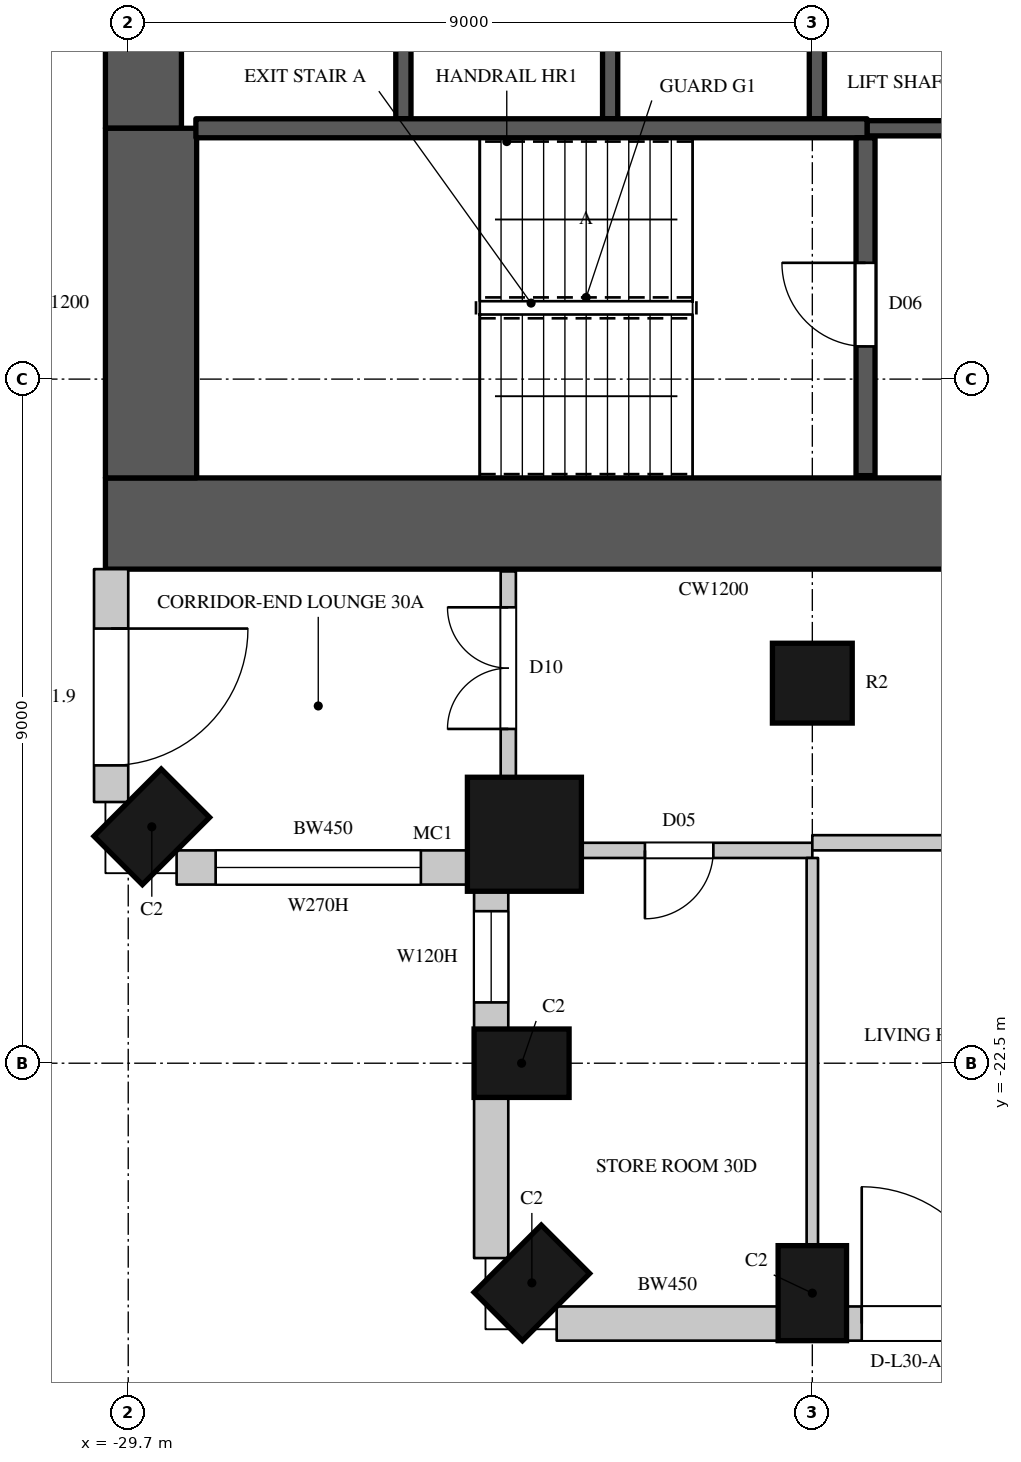
"""IFC4 building model, lengths in metres.
Left out: names, types, materials, properties, quantities, classifications, styles, units other than length and angle.
Written with IfcOpenShell. Run it as: python <this file> out.ifc"""

import sys

from ifc_helpers import new_model, si_unit, direction, frame, frame_2d, origin, origin_2d, place, context, subcontext, project, spatial, rectangle, circle, extrude, element, fill, save


model = new_model("IFC4")
c1 = context("Model", 3, precision=1e-05, world=origin(), true_north=direction((0.0, 1.0)))
c2 = subcontext(c1, "Body", "Model", "MODEL_VIEW")
j1 = project(units=[si_unit("LENGTHUNIT", "METRE"), si_unit("PLANEANGLEUNIT", "RADIAN")], contexts=[c1])
p1 = place(None, origin())
s1 = spatial("IfcSite", under=j1, at=p1, CompositionType="ELEMENT")
p2 = place(p1, origin())
s2 = spatial("IfcBuilding", under=s1, at=p2, CompositionType="ELEMENT")
p3 = place(p2, frame((0.0, 0.0, 138.3)))
s3 = spatial("IfcBuildingStorey", under=s2, at=p3, CompositionType="ELEMENT", Elevation=138.3)
p4 = place(p3, frame((-29.39, -19.39, 0.0), z_axis=(0.0, 0.0, 1.0), x_axis=(0.707106781187, -0.707106781187, 0.0)))
e1 = element("IfcColumn", 1, at=p4, inside=s3, PredefinedType="COLUMN", context=c2, shape_type="SweptSolid", body=[
    extrude(rectangle(XDim=0.9, YDim=1.25, at=origin_2d()), origin(), (0.0, 0.0, 1.0), 3.6),
])
p5 = place(p3, frame((-24.488, -19.488, 0.0), z_axis=(0.0, 0.0, 1.0), x_axis=(1.0, 0.0, 0.0)))
e2 = element("IfcColumn", 2, at=p5, inside=s3, PredefinedType="COLUMN", context=c2, shape_type="SweptSolid", body=[
    extrude(circle(Radius=0.75, at=origin_2d()), origin(), (0.0, 0.0, 1.0), 3.6),
])
for number, where, z_axis, x_axis in (
    (3, (-24.525, -22.5, 0.0), (0.0, 0.0, 1.0), (0.0, -1.0, 0.0)),
    (4, (-24.39, -25.39, 0.0), (0.0, 0.0, 1.0), (0.707, -0.707, 0.0)),
    (5, (-20.7, -25.525, 0.0), (0.0, 0.0, 1.0), (1.0, 0.0, 0.0)),
):
    element("IfcColumn", number, at=place(p3, frame(where, z_axis=z_axis, x_axis=x_axis)), inside=s3, PredefinedType="COLUMN", context=c2, shape_type="SweptSolid", body=[
        extrude(rectangle(XDim=0.9, YDim=1.25, at=origin_2d()), origin(), (0.0, 0.0, 1.0), 3.6),
    ])
p6 = place(p3, frame((-20.7, -17.5, 0.0), z_axis=(0.0, 0.0, 1.0), x_axis=(1.0, 0.0, 0.0)))
e6 = element("IfcColumn", 6, at=p6, inside=s3, PredefinedType="COLUMN", context=c2, shape_type="SweptSolid", body=[
    extrude(circle(Radius=0.525, at=origin_2d()), origin(), (0.0, 0.0, 1.0), 3.6),
])
p7 = place(p3, frame((-29.925, -16.0, 0.0), z_axis=(0.0, 0.0, 1.0), x_axis=(0.0, -1.0, 0.0)))
e7 = element("IfcWall", 7, at=p7, inside=s3, PredefinedType="SOLIDWALL", context=c2, shape_type="SweptSolid", body=[
    extrude(rectangle(XDim=3.064, YDim=0.45, at=frame_2d((1.532, 0.0))), origin(), (0.0, 0.0, 1.0), 3.3),
])
p8 = place(p7, frame((0.782, 0.0, 0.0)))
e8 = element("IfcOpeningElement", 8, at=p8, cuts=e7, PredefinedType="OPENING", context=c2, shape_type="SweptSolid", body=[
    extrude(rectangle(XDim=1.8, YDim=2.4, at=frame_2d((0.9, 1.2))), frame((0.0, 0.235, 0.0), z_axis=(0.0, -1.0, 0.0), x_axis=(1.0, 0.0, 0.0)), (0.0, 0.0, 1.0), 0.47),
])
p9 = place(p3, frame((-29.064, -19.925, 0.0), z_axis=(0.0, 0.0, 1.0), x_axis=(1.0, 0.0, 0.0)))
e9 = element("IfcWall", 9, at=p9, inside=s3, PredefinedType="SOLIDWALL", context=c2, shape_type="SweptSolid", body=[
    extrude(rectangle(XDim=3.857, YDim=0.45, at=frame_2d((1.928, 0.0))), origin(), (0.0, 0.0, 1.0), 3.3),
])
p10 = place(p9, frame((0.514, 0.0, 1.05)))
e10 = element("IfcOpeningElement", 10, at=p10, cuts=e9, PredefinedType="OPENING", context=c2, shape_type="SweptSolid", body=[
    extrude(rectangle(XDim=2.7, YDim=2.0, at=frame_2d((1.35, 1.0))), frame((0.0, 0.235, 0.0), z_axis=(0.0, -1.0, 0.0), x_axis=(1.0, 0.0, 0.0)), (0.0, 0.0, 1.0), 0.47),
])
p11 = place(p3, frame((-24.925, -20.207, 0.0), z_axis=(0.0, 0.0, 1.0), x_axis=(0.0, -1.0, 0.0)))
e11 = element("IfcWall", 11, at=p11, inside=s3, PredefinedType="SOLIDWALL", context=c2, shape_type="SweptSolid", body=[
    extrude(rectangle(XDim=1.843, YDim=0.45, at=frame_2d((0.921, 0.0))), origin(), (0.0, 0.0, 1.0), 3.3),
])
p12 = place(p11, frame((0.293, 0.0, 1.05)))
e12 = element("IfcOpeningElement", 12, at=p12, cuts=e11, PredefinedType="OPENING", context=c2, shape_type="SweptSolid", body=[
    extrude(rectangle(XDim=1.2, YDim=2.0, at=frame_2d((0.6, 1.0))), frame((0.0, 0.235, 0.0), z_axis=(0.0, -1.0, 0.0), x_axis=(1.0, 0.0, 0.0)), (0.0, 0.0, 1.0), 0.47),
])
p13 = place(p3, frame((-24.925, -22.95, 0.0), z_axis=(0.0, 0.0, 1.0), x_axis=(0.0, -1.0, 0.0)))
e13 = element("IfcWall", 13, at=p13, inside=s3, PredefinedType="SOLIDWALL", context=c2, shape_type="SweptSolid", body=[
    extrude(rectangle(XDim=2.114, YDim=0.45, at=frame_2d((1.057, 0.0))), origin(), (0.0, 0.0, 1.0), 3.3),
])
p14 = place(p3, frame((-24.064, -25.925, 0.0), z_axis=(0.0, 0.0, 1.0), x_axis=(1.0, 0.0, 0.0)))
e14 = element("IfcWall", 14, at=p14, inside=s3, PredefinedType="SOLIDWALL", context=c2, shape_type="SweptSolid", body=[
    extrude(rectangle(XDim=2.914, YDim=0.45, at=frame_2d((1.457, 0.0))), origin(), (0.0, 0.0, 1.0), 3.3),
])
p15 = place(p3, frame((-20.25, -25.925, 0.0), z_axis=(0.0, 0.0, 1.0), x_axis=(1.0, 0.0, 0.0)))
e15 = element("IfcWall", 15, at=p15, inside=s3, PredefinedType="SOLIDWALL", context=c2, shape_type="SweptSolid", body=[
    extrude(rectangle(XDim=8.1, YDim=0.45, at=frame_2d((4.05, 0.0))), origin(), (0.0, 0.0, 1.0), 3.3),
])
p16 = place(p15, frame((0.2, 0.0, 0.0)))
e16 = element("IfcOpeningElement", 16, at=p16, cuts=e15, PredefinedType="OPENING", context=c2, shape_type="SweptSolid", body=[
    extrude(rectangle(XDim=1.8, YDim=2.4, at=frame_2d((0.9, 1.2))), frame((0.0, 0.235, 0.0), z_axis=(0.0, -1.0, 0.0), x_axis=(1.0, 0.0, 0.0)), (0.0, 0.0, 1.0), 0.47),
])
p17 = place(p15, frame((2.2, 0.0, 1.05)))
e17 = element("IfcOpeningElement", 17, at=p17, cuts=e15, PredefinedType="OPENING", context=c2, shape_type="SweptSolid", body=[
    extrude(rectangle(XDim=1.2, YDim=2.0, at=frame_2d((0.6, 1.0))), frame((0.0, 0.235, 0.0), z_axis=(0.0, -1.0, 0.0), x_axis=(1.0, 0.0, 0.0)), (0.0, 0.0, 1.0), 0.47),
])
p18 = place(p15, frame((4.249, 0.0, 0.0)))
e18 = element("IfcOpeningElement", 18, at=p18, cuts=e15, PredefinedType="OPENING", context=c2, shape_type="SweptSolid", body=[
    extrude(rectangle(XDim=1.8, YDim=2.4, at=frame_2d((0.9, 1.2))), frame((0.0, 0.235, 0.0), z_axis=(0.0, -1.0, 0.0), x_axis=(1.0, 0.0, 0.0)), (0.0, 0.0, 1.0), 0.47),
])
p19 = place(p15, frame((6.7, 0.0, 1.05)))
e19 = element("IfcOpeningElement", 19, at=p19, cuts=e15, PredefinedType="OPENING", context=c2, shape_type="SweptSolid", body=[
    extrude(rectangle(XDim=1.2, YDim=2.0, at=frame_2d((0.6, 1.0))), frame((0.0, 0.235, 0.0), z_axis=(0.0, -1.0, 0.0), x_axis=(1.0, 0.0, 0.0)), (0.0, 0.0, 1.0), 0.47),
])
p20 = place(p3, frame((-30.0, -15.4, 0.0), z_axis=(0.0, 0.0, 1.0), x_axis=(1.0, 0.0, 0.0)))
e20 = element("IfcWall", 20, at=p20, inside=s3, PredefinedType="SHEAR", context=c2, shape_type="SweptSolid", body=[
    extrude(rectangle(XDim=16.0, YDim=1.2, at=frame_2d((8.0, 0.0))), origin(), (0.0, 0.0, 1.0), 3.6),
])
p21 = place(p20, frame((13.4, 0.0, 0.0)))
e21 = element("IfcOpeningElement", 21, at=p21, cuts=e20, PredefinedType="OPENING", context=c2, shape_type="SweptSolid", body=[
    extrude(rectangle(XDim=1.5, YDim=2.4, at=frame_2d((0.75, 1.2))), frame((0.0, 0.61, 0.0), z_axis=(0.0, -1.0, 0.0), x_axis=(1.0, 0.0, 0.0)), (0.0, 0.0, 1.0), 1.22),
])
p22 = place(p3, frame((-29.5, -10.2, 0.0), z_axis=(0.0, 0.0, 1.0), x_axis=(0.0, 1.0, 0.0)))
e22 = element("IfcWall", 22, at=p22, inside=s3, PredefinedType="SHEAR", context=c2, shape_type="SweptSolid", body=[
    extrude(rectangle(XDim=20.4, YDim=1.0, at=frame_2d((10.2, 0.0))), origin(), (0.0, 0.0, 1.0), 3.6),
])
p23 = place(p3, frame((-29.4, -14.8, 0.0), z_axis=(0.0, 0.0, 1.0), x_axis=(0.0, 1.0, 0.0)))
e23 = element("IfcWall", 23, at=p23, inside=s3, PredefinedType="SHEAR", context=c2, shape_type="SweptSolid", body=[
    extrude(rectangle(XDim=4.6, YDim=1.2, at=frame_2d((2.3, 0.0))), origin(), (0.0, 0.0, 1.0), 3.6),
])
p24 = place(p3, frame((-24.7, -18.752, 0.0), z_axis=(0.0, 0.0, 1.0), x_axis=(0.0, 1.0, 0.0)))
e24 = element("IfcWall", 24, at=p24, inside=s3, PredefinedType="PARTITIONING", context=c2, shape_type="SweptSolid", body=[
    extrude(rectangle(XDim=2.722, YDim=0.2, at=frame_2d((1.361, 0.0))), origin(), (0.0, 0.0, 1.0), 3.3),
])
p25 = place(p24, frame((0.65, 0.0, 0.0)))
e25 = element("IfcOpeningElement", 25, at=p25, cuts=e24, PredefinedType="OPENING", context=c2, shape_type="SweptSolid", body=[
    extrude(rectangle(XDim=1.6, YDim=2.4, at=frame_2d((0.8, 1.2))), frame((0.0, 0.11, 0.0), z_axis=(0.0, -1.0, 0.0), x_axis=(1.0, 0.0, 0.0)), (0.0, 0.0, 1.0), 0.22),
])
p26 = place(p3, frame((-23.752, -19.7, 0.0), z_axis=(0.0, 0.0, 1.0), x_axis=(1.0, 0.0, 0.0)))
e26 = element("IfcWall", 26, at=p26, inside=s3, PredefinedType="PARTITIONING", context=c2, shape_type="SweptSolid", body=[
    extrude(rectangle(XDim=3.052, YDim=0.2, at=frame_2d((1.526, 0.0))), origin(), (0.0, 0.0, 1.0), 3.3),
])
p27 = place(p26, frame((0.85, 0.0, 0.0)))
e27 = element("IfcOpeningElement", 27, at=p27, cuts=e26, PredefinedType="OPENING", context=c2, shape_type="SweptSolid", body=[
    extrude(rectangle(XDim=0.9, YDim=2.2, at=frame_2d((0.45, 1.1))), frame((0.0, 0.11, 0.0), z_axis=(0.0, -1.0, 0.0), x_axis=(1.0, 0.0, 0.0)), (0.0, 0.0, 1.0), 0.22),
])
p28 = place(p3, frame((-20.7, -19.6, 0.0), z_axis=(0.0, 0.0, 1.0), x_axis=(1.0, 0.0, 0.0)))
e28 = element("IfcWall", 28, at=p28, inside=s3, PredefinedType="PARTITIONING", context=c2, shape_type="SweptSolid", body=[
    extrude(rectangle(XDim=38.825, YDim=0.2, at=frame_2d((19.413, 0.0))), origin(), (0.0, 0.0, 1.0), 3.3),
])
p29 = place(p28, frame((3.15, 0.0, 0.0)))
e29 = element("IfcOpeningElement", 29, at=p29, cuts=e28, PredefinedType="OPENING", context=c2, shape_type="SweptSolid", body=[
    extrude(rectangle(XDim=1.1, YDim=2.4, at=frame_2d((0.55, 1.2))), frame((0.0, 0.11, 0.0), z_axis=(0.0, -1.0, 0.0), x_axis=(1.0, 0.0, 0.0)), (0.0, 0.0, 1.0), 0.22),
])
p30 = place(p28, frame((14.85, 0.0, 0.0)))
e30 = element("IfcOpeningElement", 30, at=p30, cuts=e28, PredefinedType="OPENING", context=c2, shape_type="SweptSolid", body=[
    extrude(rectangle(XDim=1.1, YDim=2.4, at=frame_2d((0.55, 1.2))), frame((0.0, 0.11, 0.0), z_axis=(0.0, -1.0, 0.0), x_axis=(1.0, 0.0, 0.0)), (0.0, 0.0, 1.0), 0.22),
])
p31 = place(p28, frame((23.85, 0.0, 0.0)))
e31 = element("IfcOpeningElement", 31, at=p31, cuts=e28, PredefinedType="OPENING", context=c2, shape_type="SweptSolid", body=[
    extrude(rectangle(XDim=1.1, YDim=2.4, at=frame_2d((0.55, 1.2))), frame((0.0, 0.11, 0.0), z_axis=(0.0, -1.0, 0.0), x_axis=(1.0, 0.0, 0.0)), (0.0, 0.0, 1.0), 0.22),
])
p32 = place(p28, frame((37.3, 0.0, 0.0)))
e32 = element("IfcOpeningElement", 32, at=p32, cuts=e28, PredefinedType="OPENING", context=c2, shape_type="SweptSolid", body=[
    extrude(rectangle(XDim=0.95, YDim=2.2, at=frame_2d((0.475, 1.1))), frame((0.0, 0.11, 0.0), z_axis=(0.0, -1.0, 0.0), x_axis=(1.0, 0.0, 0.0)), (0.0, 0.0, 1.0), 0.22),
])
p33 = place(p3, frame((-20.7, -24.9, 0.0), z_axis=(0.0, 0.0, 1.0), x_axis=(0.0, 1.0, 0.0)))
e33 = element("IfcWall", 33, at=p33, inside=s3, PredefinedType="PARTITIONING", context=c2, shape_type="SweptSolid", body=[
    extrude(rectangle(XDim=5.1, YDim=0.15, at=frame_2d((2.55, 0.0))), origin(), (0.0, 0.0, 1.0), 2.75),
])
for number, where, z_axis, x_axis in (
    (34, (-26.08, -10.075, 0.0), (0.0, 0.0, 1.0), (0.0, 1.0, 0.0)),
    (35, (-23.36, -10.075, 0.0), (0.0, 0.0, 1.0), (0.0, 1.0, 0.0)),
    (36, (-20.64, -10.075, 0.0), (0.0, 0.0, 1.0), (0.0, 1.0, 0.0)),
):
    element("IfcWall", number, at=place(p3, frame(where, z_axis=z_axis, x_axis=x_axis)), inside=s3, PredefinedType="SHEAR", context=c2, shape_type="SweptSolid", body=[
        extrude(rectangle(XDim=2.575, YDim=0.2, at=frame_2d((1.288, 0.0))), origin(), (0.0, 0.0, 1.0), 3.6),
    ])
p34 = place(p3, frame((-19.98, -10.2, 0.0), z_axis=(0.0, 0.0, 1.0), x_axis=(1.0, 0.0, 0.0)))
e37 = element("IfcWall", 37, at=p34, inside=s3, PredefinedType="SHEAR", context=c2, shape_type="SweptSolid", body=[
    extrude(rectangle(XDim=4.95, YDim=0.2, at=frame_2d((2.475, 0.0))), origin(), (0.0, 0.0, 1.0), 3.3),
])
p35 = place(p34, frame((2.95, 0.0, 0.0)))
e38 = element("IfcOpeningElement", 38, at=p35, cuts=e37, PredefinedType="OPENING", context=c2, shape_type="SweptSolid", body=[
    extrude(rectangle(XDim=1.1, YDim=2.2, at=frame_2d((0.55, 1.1))), frame((0.0, 0.11, 0.0), z_axis=(0.0, -1.0, 0.0), x_axis=(1.0, 0.0, 0.0)), (0.0, 0.0, 1.0), 0.22),
])
p36 = place(p3, frame((-28.81, -10.2, 0.0), z_axis=(0.0, 0.0, 1.0), x_axis=(1.0, 0.0, 0.0)))
e39 = element("IfcWall", 39, at=p36, inside=s3, PredefinedType="SHEAR", context=c2, shape_type="SweptSolid", body=[
    extrude(rectangle(XDim=8.83, YDim=0.25, at=frame_2d((4.415, 0.0))), origin(), (0.0, 0.0, 1.0), 3.3),
])
p37 = place(p3, frame((-20.0, -14.77, 0.0), z_axis=(0.0, 0.0, 1.0), x_axis=(0.0, 1.0, 0.0)))
e40 = element("IfcWall", 40, at=p37, inside=s3, PredefinedType="SHEAR", context=c2, shape_type="SweptSolid", body=[
    extrude(rectangle(XDim=4.445, YDim=0.25, at=frame_2d((2.223, 0.0))), origin(), (0.0, 0.0, 1.0), 3.3),
])
p38 = place(p37, frame((1.7, 0.0, 0.0)))
e41 = element("IfcOpeningElement", 41, at=p38, cuts=e40, PredefinedType="OPENING", context=c2, shape_type="SweptSolid", body=[
    extrude(rectangle(XDim=1.1, YDim=2.2, at=frame_2d((0.55, 1.1))), frame((0.0, 0.135, 0.0), z_axis=(0.0, -1.0, 0.0), x_axis=(1.0, 0.0, 0.0)), (0.0, 0.0, 1.0), 0.27),
])
p39 = place(p8, origin())
e42 = element("IfcDoor", 42, at=p39, inside=s3, OperationType="SLIDING_TO_LEFT", PredefinedType="DOOR", context=c2, shape_type="SweptSolid", body=[
    extrude(rectangle(XDim=1.8, YDim=2.4, at=frame_2d((0.9, 1.2))), frame((0.0, 0.13, 0.0), z_axis=(0.0, -1.0, 0.0), x_axis=(1.0, 0.0, 0.0)), (0.0, 0.0, 1.0), 0.05),
])
fill(e8, e42)
p40 = place(p10, origin())
e43 = element("IfcWindow", 43, at=p40, inside=s3, PartitioningType="SINGLE_PANEL", PredefinedType="WINDOW", context=c2, shape_type="SweptSolid", body=[
    extrude(rectangle(XDim=2.7, YDim=2.0, at=frame_2d((1.35, 1.0))), frame((0.0, 0.135, 0.0), z_axis=(0.0, -1.0, 0.0), x_axis=(1.0, 0.0, 0.0)), (0.0, 0.0, 1.0), 0.06),
])
fill(e10, e43)
p41 = place(p12, origin())
e44 = element("IfcWindow", 44, at=p41, inside=s3, PartitioningType="SINGLE_PANEL", PredefinedType="WINDOW", context=c2, shape_type="SweptSolid", body=[
    extrude(rectangle(XDim=1.2, YDim=2.0, at=frame_2d((0.6, 1.0))), frame((0.0, 0.135, 0.0), z_axis=(0.0, -1.0, 0.0), x_axis=(1.0, 0.0, 0.0)), (0.0, 0.0, 1.0), 0.06),
])
fill(e12, e44)
p42 = place(p16, origin())
e45 = element("IfcDoor", 45, at=p42, inside=s3, OperationType="SLIDING_TO_LEFT", PredefinedType="DOOR", context=c2, shape_type="SweptSolid", body=[
    extrude(rectangle(XDim=1.8, YDim=2.4, at=frame_2d((0.9, 1.2))), frame((0.0, 0.13, 0.0), z_axis=(0.0, -1.0, 0.0), x_axis=(1.0, 0.0, 0.0)), (0.0, 0.0, 1.0), 0.05),
])
fill(e16, e45)
p43 = place(p38, origin())
e46 = element("IfcDoor", 46, at=p43, inside=s3, OperationType="SINGLE_SWING_RIGHT", PredefinedType="DOOR", context=c2, shape_type="SweptSolid", body=[
    extrude(rectangle(XDim=1.1, YDim=2.2, at=frame_2d((0.55, 1.1))), frame((0.0, 0.025, 0.0), z_axis=(0.0, -1.0, 0.0), x_axis=(1.0, 0.0, 0.0)), (0.0, 0.0, 1.0), 0.05),
])
fill(e41, e46)
p44 = place(p27, origin())
e47 = element("IfcDoor", 47, at=p44, inside=s3, OperationType="SINGLE_SWING_RIGHT", PredefinedType="DOOR", context=c2, shape_type="SweptSolid", body=[
    extrude(rectangle(XDim=0.9, YDim=2.2, at=frame_2d((0.45, 1.1))), frame((0.0, 0.025, 0.0), z_axis=(0.0, -1.0, 0.0), x_axis=(1.0, 0.0, 0.0)), (0.0, 0.0, 1.0), 0.05),
])
fill(e27, e47)
p45 = place(p25, origin())
e48 = element("IfcDoor", 48, at=p45, inside=s3, OperationType="DOUBLE_DOOR_SINGLE_SWING", PredefinedType="DOOR", context=c2, shape_type="SweptSolid", body=[
    extrude(rectangle(XDim=1.6, YDim=2.4, at=frame_2d((0.8, 1.2))), frame((0.0, 0.025, 0.0), z_axis=(0.0, -1.0, 0.0), x_axis=(1.0, 0.0, 0.0)), (0.0, 0.0, 1.0), 0.05),
])
fill(e25, e48)
save(model, sys.argv[1])
